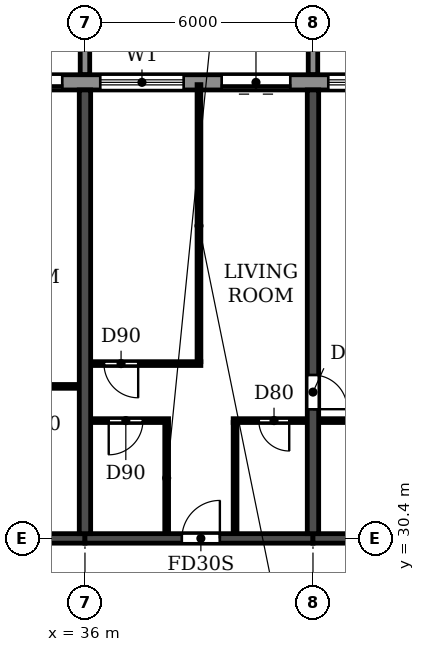
"""IFC4 building model, lengths in metres.
Left out: names, types, materials, properties, quantities, classifications, styles, units other than length and angle.
Written with IfcOpenShell. Run it as: python <this file> out.ifc"""

import sys

from ifc_helpers import new_model, si_unit, direction, frame, frame_2d, origin, place, context, subcontext, project, spatial, polyline, rectangle, outline, extrude, source, transform, mapped, element, fill, save


model = new_model("IFC4")
c1 = context("Model", 3, precision=1e-05, world=origin(), true_north=direction((0.0, 1.0)))
c2 = subcontext(c1, "Body", "Model", "MODEL_VIEW")
j1 = project(units=[si_unit("LENGTHUNIT", "METRE"), si_unit("PLANEANGLEUNIT", "RADIAN")], contexts=[c1])
p1 = place(None, origin())
s1 = spatial("IfcSite", under=j1, at=p1, CompositionType="ELEMENT")
p2 = place(p1, origin())
s2 = spatial("IfcBuilding", under=s1, at=p2, CompositionType="ELEMENT")
p3 = place(p2, frame((0.0, 0.0, 122.4)))
s3 = spatial("IfcBuildingStorey", under=s2, at=p3, CompositionType="ELEMENT", Elevation=122.4)
p4 = place(p3, frame((36.0, 30.525, 0.0), z_axis=(0.0, 0.0, 1.0), x_axis=(0.0, 1.0, 0.0)))
e1 = element("IfcWall", 1, at=p4, inside=s3, PredefinedType="SHEAR", context=c2, shape_type="SweptSolid", body=[
    extrude(rectangle(XDim=11.675, YDim=0.3, at=frame_2d((5.837, 0.0))), origin(), (0.0, 0.0, 1.0), 3.07),
])
p5 = place(p3, frame((42.0, 30.525, 0.0), z_axis=(0.0, 0.0, 1.0), x_axis=(0.0, 1.0, 0.0)))
e2 = element("IfcWall", 2, at=p5, inside=s3, PredefinedType="SHEAR", context=c2, shape_type="SweptSolid", body=[
    extrude(rectangle(XDim=11.675, YDim=0.3, at=frame_2d((5.837, 0.0))), origin(), (0.0, 0.0, 1.0), 3.07),
])
p6 = place(p5, frame((3.275, 0.0, 0.0)))
e3 = element("IfcOpeningElement", 3, at=p6, cuts=e2, PredefinedType="OPENING", context=c2, shape_type="SweptSolid", body=[
    extrude(rectangle(XDim=0.9, YDim=2.1, at=frame_2d((0.45, 1.05))), frame((0.0, 0.16, 0.0), z_axis=(0.0, -1.0, 0.0), x_axis=(1.0, 0.0, 0.0)), (0.0, 0.0, 1.0), 0.32),
])
p7 = place(p3, frame((30.0, 30.4, 0.0), z_axis=(0.0, 0.0, 1.0), x_axis=(1.0, 0.0, 0.0)))
e4 = element("IfcWall", 4, at=p7, inside=s3, PredefinedType="SHEAR", context=c2, shape_type="SweptSolid", body=[
    extrude(rectangle(XDim=6.0, YDim=0.25, at=frame_2d((3.0, 0.0))), origin(), (0.0, 0.0, 1.0), 2.47),
])
p8 = place(p7, frame((2.45, 0.0, 0.0)))
e5 = element("IfcOpeningElement", 5, at=p8, cuts=e4, PredefinedType="OPENING", context=c2, shape_type="SweptSolid", body=[
    extrude(rectangle(XDim=1.0, YDim=2.1, at=frame_2d((0.5, 1.05))), frame((0.0, 0.135, 0.0), z_axis=(0.0, -1.0, 0.0), x_axis=(1.0, 0.0, 0.0)), (0.0, 0.0, 1.0), 0.27),
])
p9 = place(p3, frame((36.0, 30.4, 0.0), z_axis=(0.0, 0.0, 1.0), x_axis=(1.0, 0.0, 0.0)))
e6 = element("IfcWall", 6, at=p9, inside=s3, PredefinedType="SHEAR", context=c2, shape_type="SweptSolid", body=[
    extrude(rectangle(XDim=6.0, YDim=0.25, at=frame_2d((3.0, 0.0))), origin(), (0.0, 0.0, 1.0), 2.47),
])
p10 = place(p9, frame((2.55, 0.0, 0.0)))
e7 = element("IfcOpeningElement", 7, at=p10, cuts=e6, PredefinedType="OPENING", context=c2, shape_type="SweptSolid", body=[
    extrude(rectangle(XDim=1.0, YDim=2.1, at=frame_2d((0.5, 1.05))), frame((0.0, 0.135, 0.0), z_axis=(0.0, -1.0, 0.0), x_axis=(1.0, 0.0, 0.0)), (0.0, 0.0, 1.0), 0.27),
])
p11 = place(p3, frame((42.0, 30.4, 0.0), z_axis=(0.0, 0.0, 1.0), x_axis=(1.0, 0.0, 0.0)))
e8 = element("IfcWall", 8, at=p11, inside=s3, PredefinedType="SHEAR", context=c2, shape_type="SweptSolid", body=[
    extrude(rectangle(XDim=6.0, YDim=0.25, at=frame_2d((3.0, 0.0))), origin(), (0.0, 0.0, 1.0), 2.47),
])
p12 = place(p3, frame((85.317, 42.4, 0.0), z_axis=(0.0, 0.0, 1.0), x_axis=(-1.0, 0.0, 0.0)))
e9 = element("IfcWall", 9, at=p12, inside=s3, PredefinedType="STANDARD", context=c2, shape_type="SweptSolid", body=[
    extrude(rectangle(XDim=68.634, YDim=0.4, at=frame_2d((34.317, 0.0))), origin(), (0.0, 0.0, 1.0), 3.07),
])
p13 = place(p12, frame((64.717, 0.0, 0.9)))
e10 = element("IfcOpeningElement", 10, at=p13, cuts=e9, PredefinedType="OPENING", context=c2, shape_type="SweptSolid", body=[
    extrude(rectangle(XDim=2.2, YDim=1.5, at=frame_2d((1.1, 0.75))), frame((0.0, 0.21, 0.0), z_axis=(0.0, -1.0, 0.0), x_axis=(1.0, 0.0, 0.0)), (0.0, 0.0, 1.0), 0.42),
])
p14 = place(p12, frame((61.917, 0.0, 0.0)))
e11 = element("IfcOpeningElement", 11, at=p14, cuts=e9, PredefinedType="OPENING", context=c2, shape_type="SweptSolid", body=[
    extrude(rectangle(XDim=1.8, YDim=2.4, at=frame_2d((0.9, 1.2))), frame((0.0, 0.21, 0.0), z_axis=(0.0, -1.0, 0.0), x_axis=(1.0, 0.0, 0.0)), (0.0, 0.0, 1.0), 0.42),
])
p15 = place(p12, frame((58.717, 0.0, 0.9)))
e12 = element("IfcOpeningElement", 12, at=p15, cuts=e9, PredefinedType="OPENING", context=c2, shape_type="SweptSolid", body=[
    extrude(rectangle(XDim=2.2, YDim=1.5, at=frame_2d((1.1, 0.75))), frame((0.0, 0.21, 0.0), z_axis=(0.0, -1.0, 0.0), x_axis=(1.0, 0.0, 0.0)), (0.0, 0.0, 1.0), 0.42),
])
p16 = place(p12, frame((55.917, 0.0, 0.0)))
e13 = element("IfcOpeningElement", 13, at=p16, cuts=e9, PredefinedType="OPENING", context=c2, shape_type="SweptSolid", body=[
    extrude(rectangle(XDim=1.8, YDim=2.4, at=frame_2d((0.9, 1.2))), frame((0.0, 0.21, 0.0), z_axis=(0.0, -1.0, 0.0), x_axis=(1.0, 0.0, 0.0)), (0.0, 0.0, 1.0), 0.42),
])
p17 = place(p12, frame((52.717, 0.0, 0.9)))
e14 = element("IfcOpeningElement", 14, at=p17, cuts=e9, PredefinedType="OPENING", context=c2, shape_type="SweptSolid", body=[
    extrude(rectangle(XDim=2.2, YDim=1.5, at=frame_2d((1.1, 0.75))), frame((0.0, 0.21, 0.0), z_axis=(0.0, -1.0, 0.0), x_axis=(1.0, 0.0, 0.0)), (0.0, 0.0, 1.0), 0.42),
])
p18 = place(p12, frame((49.917, 0.0, 0.0)))
e15 = element("IfcOpeningElement", 15, at=p18, cuts=e9, PredefinedType="OPENING", context=c2, shape_type="SweptSolid", body=[
    extrude(rectangle(XDim=1.8, YDim=2.4, at=frame_2d((0.9, 1.2))), frame((0.0, 0.21, 0.0), z_axis=(0.0, -1.0, 0.0), x_axis=(1.0, 0.0, 0.0)), (0.0, 0.0, 1.0), 0.42),
])
p19 = place(p12, frame((46.717, 0.0, 0.9)))
e16 = element("IfcOpeningElement", 16, at=p19, cuts=e9, PredefinedType="OPENING", context=c2, shape_type="SweptSolid", body=[
    extrude(rectangle(XDim=2.2, YDim=1.5, at=frame_2d((1.1, 0.75))), frame((0.0, 0.21, 0.0), z_axis=(0.0, -1.0, 0.0), x_axis=(1.0, 0.0, 0.0)), (0.0, 0.0, 1.0), 0.42),
])
p20 = place(p12, frame((43.917, 0.0, 0.0)))
e17 = element("IfcOpeningElement", 17, at=p20, cuts=e9, PredefinedType="OPENING", context=c2, shape_type="SweptSolid", body=[
    extrude(rectangle(XDim=1.8, YDim=2.4, at=frame_2d((0.9, 1.2))), frame((0.0, 0.21, 0.0), z_axis=(0.0, -1.0, 0.0), x_axis=(1.0, 0.0, 0.0)), (0.0, 0.0, 1.0), 0.42),
])
p21 = place(p12, frame((40.717, 0.0, 0.9)))
e18 = element("IfcOpeningElement", 18, at=p21, cuts=e9, PredefinedType="OPENING", context=c2, shape_type="SweptSolid", body=[
    extrude(rectangle(XDim=2.2, YDim=1.5, at=frame_2d((1.1, 0.75))), frame((0.0, 0.21, 0.0), z_axis=(0.0, -1.0, 0.0), x_axis=(1.0, 0.0, 0.0)), (0.0, 0.0, 1.0), 0.42),
])
p22 = place(p12, frame((37.717, 0.0, 0.9)))
e19 = element("IfcOpeningElement", 19, at=p22, cuts=e9, PredefinedType="OPENING", context=c2, shape_type="SweptSolid", body=[
    extrude(rectangle(XDim=2.2, YDim=1.5, at=frame_2d((1.1, 0.75))), frame((0.0, 0.21, 0.0), z_axis=(0.0, -1.0, 0.0), x_axis=(1.0, 0.0, 0.0)), (0.0, 0.0, 1.0), 0.42),
])
p23 = place(p12, frame((34.917, 0.0, 0.0)))
e20 = element("IfcOpeningElement", 20, at=p23, cuts=e9, PredefinedType="OPENING", context=c2, shape_type="SweptSolid", body=[
    extrude(rectangle(XDim=1.8, YDim=2.4, at=frame_2d((0.9, 1.2))), frame((0.0, 0.21, 0.0), z_axis=(0.0, -1.0, 0.0), x_axis=(1.0, 0.0, 0.0)), (0.0, 0.0, 1.0), 0.42),
])
p24 = place(p12, frame((31.717, 0.0, 0.9)))
e21 = element("IfcOpeningElement", 21, at=p24, cuts=e9, PredefinedType="OPENING", context=c2, shape_type="SweptSolid", body=[
    extrude(rectangle(XDim=2.2, YDim=1.5, at=frame_2d((1.1, 0.75))), frame((0.0, 0.21, 0.0), z_axis=(0.0, -1.0, 0.0), x_axis=(1.0, 0.0, 0.0)), (0.0, 0.0, 1.0), 0.42),
])
p25 = place(p12, frame((28.717, 0.0, 0.9)))
e22 = element("IfcOpeningElement", 22, at=p25, cuts=e9, PredefinedType="OPENING", context=c2, shape_type="SweptSolid", body=[
    extrude(rectangle(XDim=2.2, YDim=1.5, at=frame_2d((1.1, 0.75))), frame((0.0, 0.21, 0.0), z_axis=(0.0, -1.0, 0.0), x_axis=(1.0, 0.0, 0.0)), (0.0, 0.0, 1.0), 0.42),
])
p26 = place(p12, frame((25.717, 0.0, 0.9)))
e23 = element("IfcOpeningElement", 23, at=p26, cuts=e9, PredefinedType="OPENING", context=c2, shape_type="SweptSolid", body=[
    extrude(rectangle(XDim=2.2, YDim=1.5, at=frame_2d((1.1, 0.75))), frame((0.0, 0.21, 0.0), z_axis=(0.0, -1.0, 0.0), x_axis=(1.0, 0.0, 0.0)), (0.0, 0.0, 1.0), 0.42),
])
p27 = place(p12, frame((22.717, 0.0, 0.9)))
e24 = element("IfcOpeningElement", 24, at=p27, cuts=e9, PredefinedType="OPENING", context=c2, shape_type="SweptSolid", body=[
    extrude(rectangle(XDim=2.2, YDim=1.5, at=frame_2d((1.1, 0.75))), frame((0.0, 0.21, 0.0), z_axis=(0.0, -1.0, 0.0), x_axis=(1.0, 0.0, 0.0)), (0.0, 0.0, 1.0), 0.42),
])
p28 = place(p12, frame((19.917, 0.0, 0.0)))
e25 = element("IfcOpeningElement", 25, at=p28, cuts=e9, PredefinedType="OPENING", context=c2, shape_type="SweptSolid", body=[
    extrude(rectangle(XDim=1.8, YDim=2.4, at=frame_2d((0.9, 1.2))), frame((0.0, 0.21, 0.0), z_axis=(0.0, -1.0, 0.0), x_axis=(1.0, 0.0, 0.0)), (0.0, 0.0, 1.0), 0.42),
])
p29 = place(p12, frame((16.917, 0.0, 0.0)))
e26 = element("IfcOpeningElement", 26, at=p29, cuts=e9, PredefinedType="OPENING", context=c2, shape_type="SweptSolid", body=[
    extrude(rectangle(XDim=1.8, YDim=2.4, at=frame_2d((0.9, 1.2))), frame((0.0, 0.21, 0.0), z_axis=(0.0, -1.0, 0.0), x_axis=(1.0, 0.0, 0.0)), (0.0, 0.0, 1.0), 0.42),
])
p30 = place(p12, frame((13.717, 0.0, 0.9)))
e27 = element("IfcOpeningElement", 27, at=p30, cuts=e9, PredefinedType="OPENING", context=c2, shape_type="SweptSolid", body=[
    extrude(rectangle(XDim=2.2, YDim=1.5, at=frame_2d((1.1, 0.75))), frame((0.0, 0.21, 0.0), z_axis=(0.0, -1.0, 0.0), x_axis=(1.0, 0.0, 0.0)), (0.0, 0.0, 1.0), 0.42),
])
p31 = place(p12, frame((10.717, 0.0, 0.9)))
e28 = element("IfcOpeningElement", 28, at=p31, cuts=e9, PredefinedType="OPENING", context=c2, shape_type="SweptSolid", body=[
    extrude(rectangle(XDim=2.2, YDim=1.5, at=frame_2d((1.1, 0.75))), frame((0.0, 0.21, 0.0), z_axis=(0.0, -1.0, 0.0), x_axis=(1.0, 0.0, 0.0)), (0.0, 0.0, 1.0), 0.42),
])
p32 = place(p12, frame((7.717, 0.0, 0.9)))
e29 = element("IfcOpeningElement", 29, at=p32, cuts=e9, PredefinedType="OPENING", context=c2, shape_type="SweptSolid", body=[
    extrude(rectangle(XDim=2.2, YDim=1.5, at=frame_2d((1.1, 0.75))), frame((0.0, 0.21, 0.0), z_axis=(0.0, -1.0, 0.0), x_axis=(1.0, 0.0, 0.0)), (0.0, 0.0, 1.0), 0.42),
])
p33 = place(p12, frame((4.917, 0.0, 0.0)))
e30 = element("IfcOpeningElement", 30, at=p33, cuts=e9, PredefinedType="OPENING", context=c2, shape_type="SweptSolid", body=[
    extrude(rectangle(XDim=1.8, YDim=2.4, at=frame_2d((0.9, 1.2))), frame((0.0, 0.21, 0.0), z_axis=(0.0, -1.0, 0.0), x_axis=(1.0, 0.0, 0.0)), (0.0, 0.0, 1.0), 0.42),
])
p34 = place(p12, frame((1.717, 0.0, 0.9)))
e31 = element("IfcOpeningElement", 31, at=p34, cuts=e9, PredefinedType="OPENING", context=c2, shape_type="SweptSolid", body=[
    extrude(rectangle(XDim=2.2, YDim=1.5, at=frame_2d((1.1, 0.75))), frame((0.0, 0.21, 0.0), z_axis=(0.0, -1.0, 0.0), x_axis=(1.0, 0.0, 0.0)), (0.0, 0.0, 1.0), 0.42),
])
m1 = source(origin(), c2, "Body", "SweptSolid", [
    extrude(outline(polyline([(0.0, 0.0), (0.25, 0.0), (0.25, 3.1), (0.0, 3.1), (0.0, 0.0)])), origin(), (0.0, 0.0, 1.0), 3.1),
])
for number, where in (
    (32, (35.875, 42.6, 0.0)),
    (33, (41.875, 42.6, 0.0)),
):
    element("IfcWall", number, at=place(p3, frame(where)), inside=s3, PredefinedType="STANDARD", context=c2, shape_type="MappedRepresentation", body=[
        mapped(m1, transform((0.0, 0.0, 0.0))),
    ])
p35 = place(p3, frame((36.16, 33.5, 0.0), z_axis=(0.0, 0.0, 1.0), x_axis=(1.0, 0.0, 0.0)))
e34 = element("IfcWall", 34, at=p35, inside=s3, PredefinedType="PARTITIONING", context=c2, shape_type="SweptSolid", body=[
    extrude(rectangle(XDim=2.04, YDim=0.1, at=frame_2d((1.02, 0.0))), origin(), (0.0, 0.0, 1.0), 3.07),
])
p36 = place(p35, frame((0.465, 0.0, 0.0)))
e35 = element("IfcOpeningElement", 35, at=p36, cuts=e34, PredefinedType="OPENING", context=c2, shape_type="SweptSolid", body=[
    extrude(rectangle(XDim=0.9, YDim=2.1, at=frame_2d((0.45, 1.05))), frame((0.0, 0.06, 0.0), z_axis=(0.0, -1.0, 0.0), x_axis=(1.0, 0.0, 0.0)), (0.0, 0.0, 1.0), 0.12),
])
p37 = place(p3, frame((39.9, 33.5, 0.0), z_axis=(0.0, 0.0, 1.0), x_axis=(1.0, 0.0, 0.0)))
e36 = element("IfcWall", 36, at=p37, inside=s3, PredefinedType="PARTITIONING", context=c2, shape_type="SweptSolid", body=[
    extrude(rectangle(XDim=1.94, YDim=0.1, at=frame_2d((0.97, 0.0))), origin(), (0.0, 0.0, 1.0), 3.07),
])
p38 = place(p37, frame((0.675, 0.0, 0.0)))
e37 = element("IfcOpeningElement", 37, at=p38, cuts=e36, PredefinedType="OPENING", context=c2, shape_type="SweptSolid", body=[
    extrude(rectangle(XDim=0.8, YDim=2.1, at=frame_2d((0.4, 1.05))), frame((0.0, 0.06, 0.0), z_axis=(0.0, -1.0, 0.0), x_axis=(1.0, 0.0, 0.0)), (0.0, 0.0, 1.0), 0.12),
])
p39 = place(p3, frame((42.16, 33.5, 0.0), z_axis=(0.0, 0.0, 1.0), x_axis=(1.0, 0.0, 0.0)))
e38 = element("IfcWall", 38, at=p39, inside=s3, PredefinedType="PARTITIONING", context=c2, shape_type="SweptSolid", body=[
    extrude(rectangle(XDim=2.74, YDim=0.1, at=frame_2d((1.37, 0.0))), origin(), (0.0, 0.0, 1.0), 3.07),
])
p40 = place(p39, frame((0.94, 0.0, 0.0)))
e39 = element("IfcOpeningElement", 39, at=p40, cuts=e38, PredefinedType="OPENING", context=c2, shape_type="SweptSolid", body=[
    extrude(rectangle(XDim=0.8, YDim=2.1, at=frame_2d((0.4, 1.05))), frame((0.0, 0.06, 0.0), z_axis=(0.0, -1.0, 0.0), x_axis=(1.0, 0.0, 0.0)), (0.0, 0.0, 1.0), 0.12),
])
p41 = place(p3, frame((33.8, 34.4, 0.0), z_axis=(0.0, 0.0, 1.0), x_axis=(1.0, 0.0, 0.0)))
e40 = element("IfcWall", 40, at=p41, inside=s3, PredefinedType="PARTITIONING", context=c2, shape_type="SweptSolid", body=[
    extrude(rectangle(XDim=2.04, YDim=0.1, at=frame_2d((1.02, 0.0))), origin(), (0.0, 0.0, 1.0), 3.07),
])
p42 = place(p3, frame((36.16, 35.0, 0.0), z_axis=(0.0, 0.0, 1.0), x_axis=(1.0, 0.0, 0.0)))
e41 = element("IfcWall", 41, at=p42, inside=s3, PredefinedType="PARTITIONING", context=c2, shape_type="SweptSolid", body=[
    extrude(rectangle(XDim=2.89, YDim=0.1, at=frame_2d((1.445, 0.0))), origin(), (0.0, 0.0, 1.0), 3.07),
])
p43 = place(p42, frame((0.34, 0.0, 0.0)))
e42 = element("IfcOpeningElement", 42, at=p43, cuts=e41, PredefinedType="OPENING", context=c2, shape_type="SweptSolid", body=[
    extrude(rectangle(XDim=0.9, YDim=2.1, at=frame_2d((0.45, 1.05))), frame((0.0, 0.06, 0.0), z_axis=(0.0, -1.0, 0.0), x_axis=(1.0, 0.0, 0.0)), (0.0, 0.0, 1.0), 0.12),
])
p44 = place(p3, frame((38.15, 30.535, 0.0), z_axis=(0.0, 0.0, 1.0), x_axis=(0.0, 1.0, 0.0)))
e43 = element("IfcWall", 43, at=p44, inside=s3, PredefinedType="PARTITIONING", context=c2, shape_type="SweptSolid", body=[
    extrude(rectangle(XDim=2.915, YDim=0.1, at=frame_2d((1.458, 0.0))), origin(), (0.0, 0.0, 1.0), 3.07),
])
p45 = place(p3, frame((39.0, 35.05, 0.0), z_axis=(0.0, 0.0, 1.0), x_axis=(0.0, 1.0, 0.0)))
e44 = element("IfcWall", 44, at=p45, inside=s3, PredefinedType="PARTITIONING", context=c2, shape_type="SweptSolid", body=[
    extrude(rectangle(XDim=7.29, YDim=0.1, at=frame_2d((3.645, 0.0))), origin(), (0.0, 0.0, 1.0), 3.07),
])
p46 = place(p3, frame((39.95, 30.535, 0.0), z_axis=(0.0, 0.0, 1.0), x_axis=(0.0, 1.0, 0.0)))
e45 = element("IfcWall", 45, at=p46, inside=s3, PredefinedType="PARTITIONING", context=c2, shape_type="SweptSolid", body=[
    extrude(rectangle(XDim=2.915, YDim=0.1, at=frame_2d((1.458, 0.0))), origin(), (0.0, 0.0, 1.0), 3.07),
])
p47 = place(p18, origin())
e46 = element("IfcDoor", 46, at=p47, inside=s3, OperationType="DOUBLE_DOOR_SLIDING", PredefinedType="DOOR", context=c2, shape_type="SweptSolid", body=[
    extrude(rectangle(XDim=1.8, YDim=2.4, at=frame_2d((0.9, 1.2))), frame((0.0, 0.025, 0.0), z_axis=(0.0, -1.0, 0.0), x_axis=(1.0, 0.0, 0.0)), (0.0, 0.0, 1.0), 0.05),
])
fill(e15, e46)
p48 = place(p19, origin())
e47 = element("IfcWindow", 47, at=p48, inside=s3, PartitioningType="DOUBLE_PANEL_HORIZONTAL", PredefinedType="WINDOW", context=c2, shape_type="SweptSolid", body=[
    extrude(rectangle(XDim=2.2, YDim=1.5, at=frame_2d((1.1, 0.75))), frame((0.0, 0.03, 0.0), z_axis=(0.0, -1.0, 0.0), x_axis=(1.0, 0.0, 0.0)), (0.0, 0.0, 1.0), 0.06),
])
fill(e16, e47)
p49 = place(p20, origin())
e48 = element("IfcDoor", 48, at=p49, inside=s3, OperationType="DOUBLE_DOOR_SLIDING", PredefinedType="DOOR", context=c2, shape_type="SweptSolid", body=[
    extrude(rectangle(XDim=1.8, YDim=2.4, at=frame_2d((0.9, 1.2))), frame((0.0, 0.025, 0.0), z_axis=(0.0, -1.0, 0.0), x_axis=(1.0, 0.0, 0.0)), (0.0, 0.0, 1.0), 0.05),
])
fill(e17, e48)
p50 = place(p21, origin())
e49 = element("IfcWindow", 49, at=p50, inside=s3, PartitioningType="DOUBLE_PANEL_HORIZONTAL", PredefinedType="WINDOW", context=c2, shape_type="SweptSolid", body=[
    extrude(rectangle(XDim=2.2, YDim=1.5, at=frame_2d((1.1, 0.75))), frame((0.0, 0.03, 0.0), z_axis=(0.0, -1.0, 0.0), x_axis=(1.0, 0.0, 0.0)), (0.0, 0.0, 1.0), 0.06),
])
fill(e18, e49)
p51 = place(p43, frame((0.9, 0.0, 0.0), z_axis=(0.0, 0.0, 1.0), x_axis=(-1.0, 0.0, 0.0)))
e50 = element("IfcDoor", 50, at=p51, inside=s3, OperationType="SINGLE_SWING_LEFT", PredefinedType="DOOR", context=c2, shape_type="SweptSolid", body=[
    extrude(rectangle(XDim=0.9, YDim=2.1, at=frame_2d((0.45, 1.05))), frame((0.0, 0.025, 0.0), z_axis=(0.0, -1.0, 0.0), x_axis=(1.0, 0.0, 0.0)), (0.0, 0.0, 1.0), 0.05),
])
fill(e42, e50)
p52 = place(p36, frame((0.9, 0.0, 0.0), z_axis=(0.0, 0.0, 1.0), x_axis=(-1.0, 0.0, 0.0)))
e51 = element("IfcDoor", 51, at=p52, inside=s3, OperationType="SINGLE_SWING_RIGHT", PredefinedType="DOOR", context=c2, shape_type="SweptSolid", body=[
    extrude(rectangle(XDim=0.9, YDim=2.1, at=frame_2d((0.45, 1.05))), frame((0.0, 0.025, 0.0), z_axis=(0.0, -1.0, 0.0), x_axis=(1.0, 0.0, 0.0)), (0.0, 0.0, 1.0), 0.05),
])
fill(e35, e51)
p53 = place(p10, origin())
e52 = element("IfcDoor", 52, at=p53, inside=s3, OperationType="SINGLE_SWING_RIGHT", PredefinedType="DOOR", context=c2, shape_type="SweptSolid", body=[
    extrude(rectangle(XDim=1.0, YDim=2.1, at=frame_2d((0.5, 1.05))), frame((0.0, 0.025, 0.0), z_axis=(0.0, -1.0, 0.0), x_axis=(1.0, 0.0, 0.0)), (0.0, 0.0, 1.0), 0.05),
])
fill(e7, e52)
p54 = place(p38, frame((0.8, 0.0, 0.0), z_axis=(0.0, 0.0, 1.0), x_axis=(-1.0, 0.0, 0.0)))
e53 = element("IfcDoor", 53, at=p54, inside=s3, OperationType="SINGLE_SWING_LEFT", PredefinedType="DOOR", context=c2, shape_type="SweptSolid", body=[
    extrude(rectangle(XDim=0.8, YDim=2.1, at=frame_2d((0.4, 1.05))), frame((0.0, 0.025, 0.0), z_axis=(0.0, -1.0, 0.0), x_axis=(1.0, 0.0, 0.0)), (0.0, 0.0, 1.0), 0.05),
])
fill(e37, e53)
p55 = place(p6, frame((0.9, 0.0, 0.0), z_axis=(0.0, 0.0, 1.0), x_axis=(-1.0, 0.0, 0.0)))
e54 = element("IfcDoor", 54, at=p55, inside=s3, OperationType="SINGLE_SWING_RIGHT", PredefinedType="DOOR", context=c2, shape_type="SweptSolid", body=[
    extrude(rectangle(XDim=0.9, YDim=2.1, at=frame_2d((0.45, 1.05))), frame((0.0, 0.025, 0.0), z_axis=(0.0, -1.0, 0.0), x_axis=(1.0, 0.0, 0.0)), (0.0, 0.0, 1.0), 0.05),
])
fill(e3, e54)
save(model, sys.argv[1])
